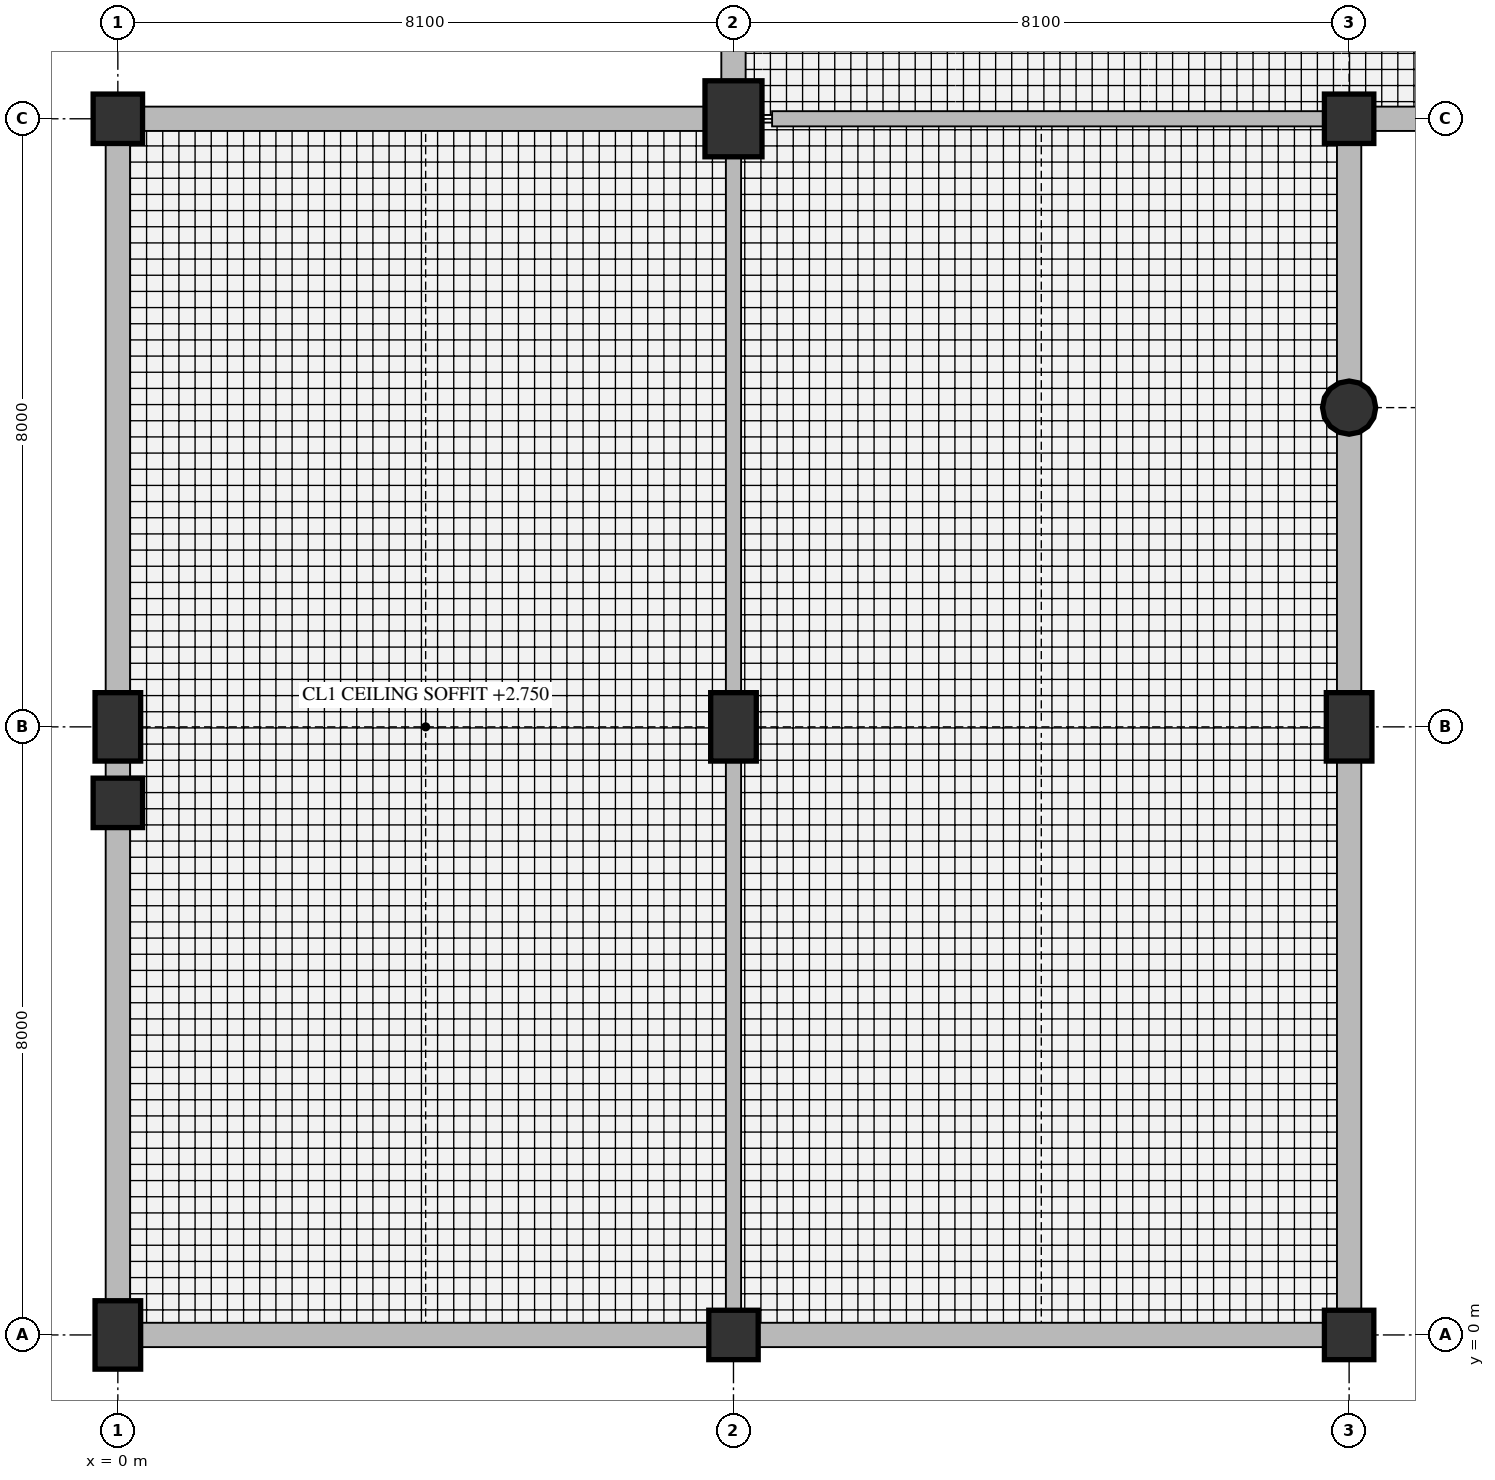
"""IFC4 building model, lengths in metres.
Left out: names, types, materials, properties, quantities, classifications, styles, units other than length and angle.
Written with IfcOpenShell. Run it as: python <this file> out.ifc"""

import sys

from ifc_helpers import new_model, si_unit, direction, frame, frame_2d, origin, origin_with_axes, origin_2d, place, context, subcontext, project, spatial, rectangle, circle, extrude, element, fill, save


model = new_model("IFC4")
c1 = context("Model", 3, precision=1e-05, world=origin(), true_north=direction((0.0, 1.0)))
c2 = subcontext(c1, "Body", "Model", "MODEL_VIEW")
j1 = project(units=[si_unit("LENGTHUNIT", "METRE"), si_unit("PLANEANGLEUNIT", "RADIAN")], contexts=[c1])
p1 = place(None, origin())
s1 = spatial("IfcSite", under=j1, at=p1, CompositionType="ELEMENT")
p2 = place(p1, origin())
s2 = spatial("IfcBuilding", under=s1, at=p2, CompositionType="ELEMENT")
p3 = place(p2, origin())
s3 = spatial("IfcBuildingStorey", under=s2, at=p3, CompositionType="ELEMENT", Elevation=0.0)
p4 = place(p3, origin_with_axes())
e1 = element("IfcColumn", 1, at=p4, inside=s3, PredefinedType="COLUMN", context=c2, shape_type="SweptSolid", body=[
    extrude(rectangle(XDim=0.6, YDim=0.9, at=origin_2d()), origin(), (0.0, 0.0, 1.0), 5.4),
])
p5 = place(p3, frame((0.0, 7.0, 0.0), z_axis=(0.0, 0.0, 1.0), x_axis=(1.0, 0.0, 0.0)))
e2 = element("IfcColumn", 2, at=p5, inside=s3, PredefinedType="COLUMN", context=c2, shape_type="SweptSolid", body=[
    extrude(rectangle(XDim=0.65, YDim=0.65, at=origin_2d()), origin(), (0.0, 0.0, 1.0), 5.4),
])
p6 = place(p3, frame((0.0, 8.0, 0.0), z_axis=(0.0, 0.0, 1.0), x_axis=(1.0, 0.0, 0.0)))
e3 = element("IfcColumn", 3, at=p6, inside=s3, PredefinedType="COLUMN", context=c2, shape_type="SweptSolid", body=[
    extrude(rectangle(XDim=0.6, YDim=0.9, at=origin_2d()), origin(), (0.0, 0.0, 1.0), 5.4),
])
for number, where, z_axis, x_axis in (
    (4, (0.0, 16.0, 0.0), (0.0, 0.0, 1.0), (1.0, 0.0, 0.0)),
    (5, (8.1, 0.0, 0.0), (0.0, 0.0, 1.0), (1.0, 0.0, 0.0)),
):
    element("IfcColumn", number, at=place(p3, frame(where, z_axis=z_axis, x_axis=x_axis)), inside=s3, PredefinedType="COLUMN", context=c2, shape_type="SweptSolid", body=[
        extrude(rectangle(XDim=0.65, YDim=0.65, at=origin_2d()), origin(), (0.0, 0.0, 1.0), 5.4),
    ])
p7 = place(p3, frame((8.1, 8.0, 0.0), z_axis=(0.0, 0.0, 1.0), x_axis=(1.0, 0.0, 0.0)))
e6 = element("IfcColumn", 6, at=p7, inside=s3, PredefinedType="COLUMN", context=c2, shape_type="SweptSolid", body=[
    extrude(rectangle(XDim=0.6, YDim=0.9, at=origin_2d()), origin(), (0.0, 0.0, 1.0), 5.4),
])
p8 = place(p3, frame((8.1, 16.0, 0.0), z_axis=(0.0, 0.0, 1.0), x_axis=(1.0, 0.0, 0.0)))
e7 = element("IfcColumn", 7, at=p8, inside=s3, PredefinedType="COLUMN", context=c2, shape_type="SweptSolid", body=[
    extrude(rectangle(XDim=0.75, YDim=1.0, at=origin_2d()), origin(), (0.0, 0.0, 1.0), 5.4),
])
p9 = place(p3, frame((16.2, 0.0, 0.0), z_axis=(0.0, 0.0, 1.0), x_axis=(1.0, 0.0, 0.0)))
e8 = element("IfcColumn", 8, at=p9, inside=s3, PredefinedType="COLUMN", context=c2, shape_type="SweptSolid", body=[
    extrude(rectangle(XDim=0.65, YDim=0.65, at=origin_2d()), origin(), (0.0, 0.0, 1.0), 5.4),
])
p10 = place(p3, frame((16.2, 8.0, 0.0), z_axis=(0.0, 0.0, 1.0), x_axis=(1.0, 0.0, 0.0)))
e9 = element("IfcColumn", 9, at=p10, inside=s3, PredefinedType="COLUMN", context=c2, shape_type="SweptSolid", body=[
    extrude(rectangle(XDim=0.6, YDim=0.9, at=origin_2d()), origin(), (0.0, 0.0, 1.0), 5.4),
])
p11 = place(p3, frame((16.2, 16.0, 0.0), z_axis=(0.0, 0.0, 1.0), x_axis=(1.0, 0.0, 0.0)))
e10 = element("IfcColumn", 10, at=p11, inside=s3, PredefinedType="COLUMN", context=c2, shape_type="SweptSolid", body=[
    extrude(rectangle(XDim=0.65, YDim=0.65, at=origin_2d()), origin(), (0.0, 0.0, 1.0), 5.4),
])
p12 = place(p3, frame((16.2, 12.2, 0.0), z_axis=(0.0, 0.0, 1.0), x_axis=(1.0, 0.0, 0.0)))
e11 = element("IfcColumn", 11, at=p12, inside=s3, PredefinedType="COLUMN", context=c2, shape_type="SweptSolid", body=[
    extrude(circle(Radius=0.35, at=origin_2d()), origin(), (0.0, 0.0, 1.0), 6.3),
])
p13 = place(p3, frame((0.0, 16.0, 0.0), z_axis=(0.0, 0.0, 1.0), x_axis=(0.0, -1.0, 0.0)))
e12 = element("IfcWall", 12, at=p13, inside=s3, PredefinedType="SOLIDWALL", context=c2, shape_type="SweptSolid", body=[
    extrude(rectangle(XDim=16.0, YDim=0.32, at=frame_2d((8.0, 0.0))), origin(), (0.0, 0.0, 1.0), 4.512),
])
p14 = place(p13, frame((4.95, 0.0, 0.95)))
e13 = element("IfcOpeningElement", 13, at=p14, cuts=e12, PredefinedType="OPENING", context=c2, shape_type="SweptSolid", body=[
    extrude(rectangle(XDim=0.9, YDim=1.8, at=frame_2d((0.45, 0.9))), frame((0.0, 0.17, 0.0), z_axis=(0.0, -1.0, 0.0), x_axis=(1.0, 0.0, 0.0)), (0.0, 0.0, 1.0), 0.34),
])
p15 = place(p3, origin_with_axes())
e14 = element("IfcWall", 14, at=p15, inside=s3, PredefinedType="SOLIDWALL", context=c2, shape_type="SweptSolid", body=[
    extrude(rectangle(XDim=16.2, YDim=0.32, at=frame_2d((8.1, 0.0))), origin(), (0.0, 0.0, 1.0), 4.412),
])
p16 = place(p15, frame((3.536, 0.0, 0.0)))
e15 = element("IfcOpeningElement", 15, at=p16, cuts=e14, PredefinedType="OPENING", context=c2, shape_type="SweptSolid", body=[
    extrude(rectangle(XDim=2.0, YDim=2.5, at=frame_2d((1.0, 1.25))), frame((0.0, 0.17, 0.0), z_axis=(0.0, -1.0, 0.0), x_axis=(1.0, 0.0, 0.0)), (0.0, 0.0, 1.0), 0.34),
])
p17 = place(p3, frame((16.2, 0.0, 0.0), z_axis=(0.0, 0.0, 1.0), x_axis=(0.0, 1.0, 0.0)))
e16 = element("IfcWall", 16, at=p17, inside=s3, PredefinedType="SOLIDWALL", context=c2, shape_type="SweptSolid", body=[
    extrude(rectangle(XDim=16.0, YDim=0.32, at=frame_2d((8.0, 0.0))), origin(), (0.0, 0.0, 1.0), 4.512),
])
p18 = place(p17, frame((3.38, 0.0, 0.0)))
e17 = element("IfcOpeningElement", 17, at=p18, cuts=e16, PredefinedType="OPENING", context=c2, shape_type="SweptSolid", body=[
    extrude(rectangle(XDim=2.2, YDim=2.6, at=frame_2d((1.1, 1.3))), frame((0.0, 0.17, 0.0), z_axis=(0.0, -1.0, 0.0), x_axis=(1.0, 0.0, 0.0)), (0.0, 0.0, 1.0), 0.34),
])
p19 = place(p3, frame((16.2, 16.0, 0.0), z_axis=(0.0, 0.0, 1.0), x_axis=(1.0, 0.0, 0.0)))
e18 = element("IfcWall", 18, at=p19, inside=s3, PredefinedType="SOLIDWALL", context=c2, shape_type="SweptSolid", body=[
    extrude(rectangle(XDim=16.2, YDim=0.32, at=frame_2d((8.1, 0.0))), origin(), (0.0, 0.0, 1.0), 4.412),
])
p20 = place(p19, frame((3.586, 0.0, 0.0)))
e19 = element("IfcOpeningElement", 19, at=p20, cuts=e18, PredefinedType="OPENING", context=c2, shape_type="SweptSolid", body=[
    extrude(rectangle(XDim=1.9, YDim=2.4, at=frame_2d((0.95, 1.2))), frame((0.0, 0.17, 0.0), z_axis=(0.0, -1.0, 0.0), x_axis=(1.0, 0.0, 0.0)), (0.0, 0.0, 1.0), 0.34),
])
p21 = place(p3, frame((8.1, 25.0, 0.0), z_axis=(0.0, 0.0, 1.0), x_axis=(0.0, -1.0, 0.0)))
e20 = element("IfcWall", 20, at=p21, inside=s3, PredefinedType="SOLIDWALL", context=c2, shape_type="SweptSolid", body=[
    extrude(rectangle(XDim=9.0, YDim=0.32, at=frame_2d((4.5, 0.0))), origin(), (0.0, 0.0, 1.0), 3.912),
])
p22 = place(p21, frame((3.6, 0.0, 0.85)))
e21 = element("IfcOpeningElement", 21, at=p22, cuts=e20, PredefinedType="OPENING", context=c2, shape_type="SweptSolid", body=[
    extrude(rectangle(XDim=1.8, YDim=2.1, at=frame_2d((0.9, 1.05))), frame((0.0, 0.17, 0.0), z_axis=(0.0, -1.0, 0.0), x_axis=(1.0, 0.0, 0.0)), (0.0, 0.0, 1.0), 0.34),
])
p23 = place(p3, frame((8.1, 16.0, 0.0), z_axis=(0.0, 0.0, 1.0), x_axis=(-1.0, 0.0, 0.0)))
e22 = element("IfcWall", 22, at=p23, inside=s3, PredefinedType="SOLIDWALL", context=c2, shape_type="SweptSolid", body=[
    extrude(rectangle(XDim=8.1, YDim=0.32, at=frame_2d((4.05, 0.0))), origin(), (0.0, 0.0, 1.0), 4.462),
])
p24 = place(p23, frame((3.15, 0.0, 0.85)))
e23 = element("IfcOpeningElement", 23, at=p24, cuts=e22, PredefinedType="OPENING", context=c2, shape_type="SweptSolid", body=[
    extrude(rectangle(XDim=1.8, YDim=2.4, at=frame_2d((0.9, 1.2))), frame((0.0, 0.17, 0.0), z_axis=(0.0, -1.0, 0.0), x_axis=(1.0, 0.0, 0.0)), (0.0, 0.0, 1.0), 0.34),
])
p25 = place(p3, frame((8.608, 16.0, 0.0), z_axis=(0.0, 0.0, 1.0), x_axis=(1.0, 0.0, 0.0)))
e24 = element("IfcWall", 24, at=p25, inside=s3, PredefinedType="PARTITIONING", context=c2, shape_type="SweptSolid", body=[
    extrude(rectangle(XDim=7.259, YDim=0.2, at=frame_2d((3.629, 0.0))), origin(), (0.0, 0.0, 1.0), 4.412),
])
p26 = place(p25, frame((3.08, 0.0, 0.0)))
e25 = element("IfcOpeningElement", 25, at=p26, cuts=e24, PredefinedType="OPENING", context=c2, shape_type="SweptSolid", body=[
    extrude(rectangle(XDim=1.1, YDim=2.2, at=frame_2d((0.55, 1.1))), frame((0.0, 0.11, 0.0), z_axis=(0.0, -1.0, 0.0), x_axis=(1.0, 0.0, 0.0)), (0.0, 0.0, 1.0), 0.22),
])
p27 = place(p3, frame((8.1, 0.333, 0.0), z_axis=(0.0, 0.0, 1.0), x_axis=(0.0, 1.0, 0.0)))
e26 = element("IfcWall", 26, at=p27, inside=s3, PredefinedType="PARTITIONING", context=c2, shape_type="SweptSolid", body=[
    extrude(rectangle(XDim=7.209, YDim=0.2, at=frame_2d((3.604, 0.0))), origin(), (0.0, 0.0, 1.0), 4.512),
])
p28 = place(p27, frame((3.104, 0.0, 0.0)))
e27 = element("IfcOpeningElement", 27, at=p28, cuts=e26, PredefinedType="OPENING", context=c2, shape_type="SweptSolid", body=[
    extrude(rectangle(XDim=1.0, YDim=2.2, at=frame_2d((0.5, 1.1))), frame((0.0, 0.11, 0.0), z_axis=(0.0, -1.0, 0.0), x_axis=(1.0, 0.0, 0.0)), (0.0, 0.0, 1.0), 0.22),
])
p29 = place(p3, frame((8.1, 8.458, 0.0), z_axis=(0.0, 0.0, 1.0), x_axis=(0.0, 1.0, 0.0)))
e28 = element("IfcWall", 28, at=p29, inside=s3, PredefinedType="PARTITIONING", context=c2, shape_type="SweptSolid", body=[
    extrude(rectangle(XDim=7.034, YDim=0.2, at=frame_2d((3.517, 0.0))), origin(), (0.0, 0.0, 1.0), 4.695),
])
p30 = place(p14, origin())
e29 = element("IfcWindow", 29, at=p30, inside=s3, PartitioningType="SINGLE_PANEL", PredefinedType="WINDOW", context=c2, shape_type="SweptSolid", body=[
    extrude(rectangle(XDim=0.9, YDim=1.8, at=frame_2d((0.45, 0.9))), frame((0.0, 0.03, 0.0), z_axis=(0.0, -1.0, 0.0), x_axis=(1.0, 0.0, 0.0)), (0.0, 0.0, 1.0), 0.06),
])
fill(e13, e29)
p31 = place(p16, frame((2.0, 0.0, 0.0), z_axis=(0.0, 0.0, 1.0), x_axis=(-1.0, 0.0, 0.0)))
e30 = element("IfcDoor", 30, at=p31, inside=s3, OperationType="DOUBLE_DOOR_SINGLE_SWING", PredefinedType="DOOR", context=c2, shape_type="SweptSolid", body=[
    extrude(rectangle(XDim=2.0, YDim=2.5, at=frame_2d((1.0, 1.25))), frame((0.0, 0.025, 0.0), z_axis=(0.0, -1.0, 0.0), x_axis=(1.0, 0.0, 0.0)), (0.0, 0.0, 1.0), 0.05),
])
fill(e15, e30)
p32 = place(p18, frame((2.2, 0.0, 0.0), z_axis=(0.0, 0.0, 1.0), x_axis=(-1.0, 0.0, 0.0)))
e31 = element("IfcDoor", 31, at=p32, inside=s3, OperationType="DOUBLE_DOOR_SINGLE_SWING", PredefinedType="DOOR", context=c2, shape_type="SweptSolid", body=[
    extrude(rectangle(XDim=2.2, YDim=2.6, at=frame_2d((1.1, 1.3))), frame((0.0, 0.025, 0.0), z_axis=(0.0, -1.0, 0.0), x_axis=(1.0, 0.0, 0.0)), (0.0, 0.0, 1.0), 0.05),
])
fill(e17, e31)
p33 = place(p24, origin())
e32 = element("IfcWindow", 32, at=p33, inside=s3, PartitioningType="TRIPLE_PANEL_VERTICAL", PredefinedType="WINDOW", context=c2, shape_type="SweptSolid", body=[
    extrude(rectangle(XDim=1.8, YDim=2.4, at=frame_2d((0.9, 1.2))), frame((0.0, 0.03, 0.0), z_axis=(0.0, -1.0, 0.0), x_axis=(1.0, 0.0, 0.0)), (0.0, 0.0, 1.0), 0.06),
])
fill(e23, e32)
p34 = place(p26, frame((1.1, 0.0, 0.0), z_axis=(0.0, 0.0, 1.0), x_axis=(-1.0, 0.0, 0.0)))
e33 = element("IfcDoor", 33, at=p34, inside=s3, OperationType="SINGLE_SWING_LEFT", PredefinedType="DOOR", context=c2, shape_type="SweptSolid", body=[
    extrude(rectangle(XDim=1.1, YDim=2.2, at=frame_2d((0.55, 1.1))), frame((0.0, 0.025, 0.0), z_axis=(0.0, -1.0, 0.0), x_axis=(1.0, 0.0, 0.0)), (0.0, 0.0, 1.0), 0.05),
])
fill(e25, e33)
p35 = place(p28, origin())
e34 = element("IfcDoor", 34, at=p35, inside=s3, OperationType="SINGLE_SWING_LEFT", PredefinedType="DOOR", context=c2, shape_type="SweptSolid", body=[
    extrude(rectangle(XDim=1.0, YDim=2.2, at=frame_2d((0.5, 1.1))), frame((0.0, 0.025, 0.0), z_axis=(0.0, -1.0, 0.0), x_axis=(1.0, 0.0, 0.0)), (0.0, 0.0, 1.0), 0.05),
])
fill(e27, e34)
save(model, sys.argv[1])
